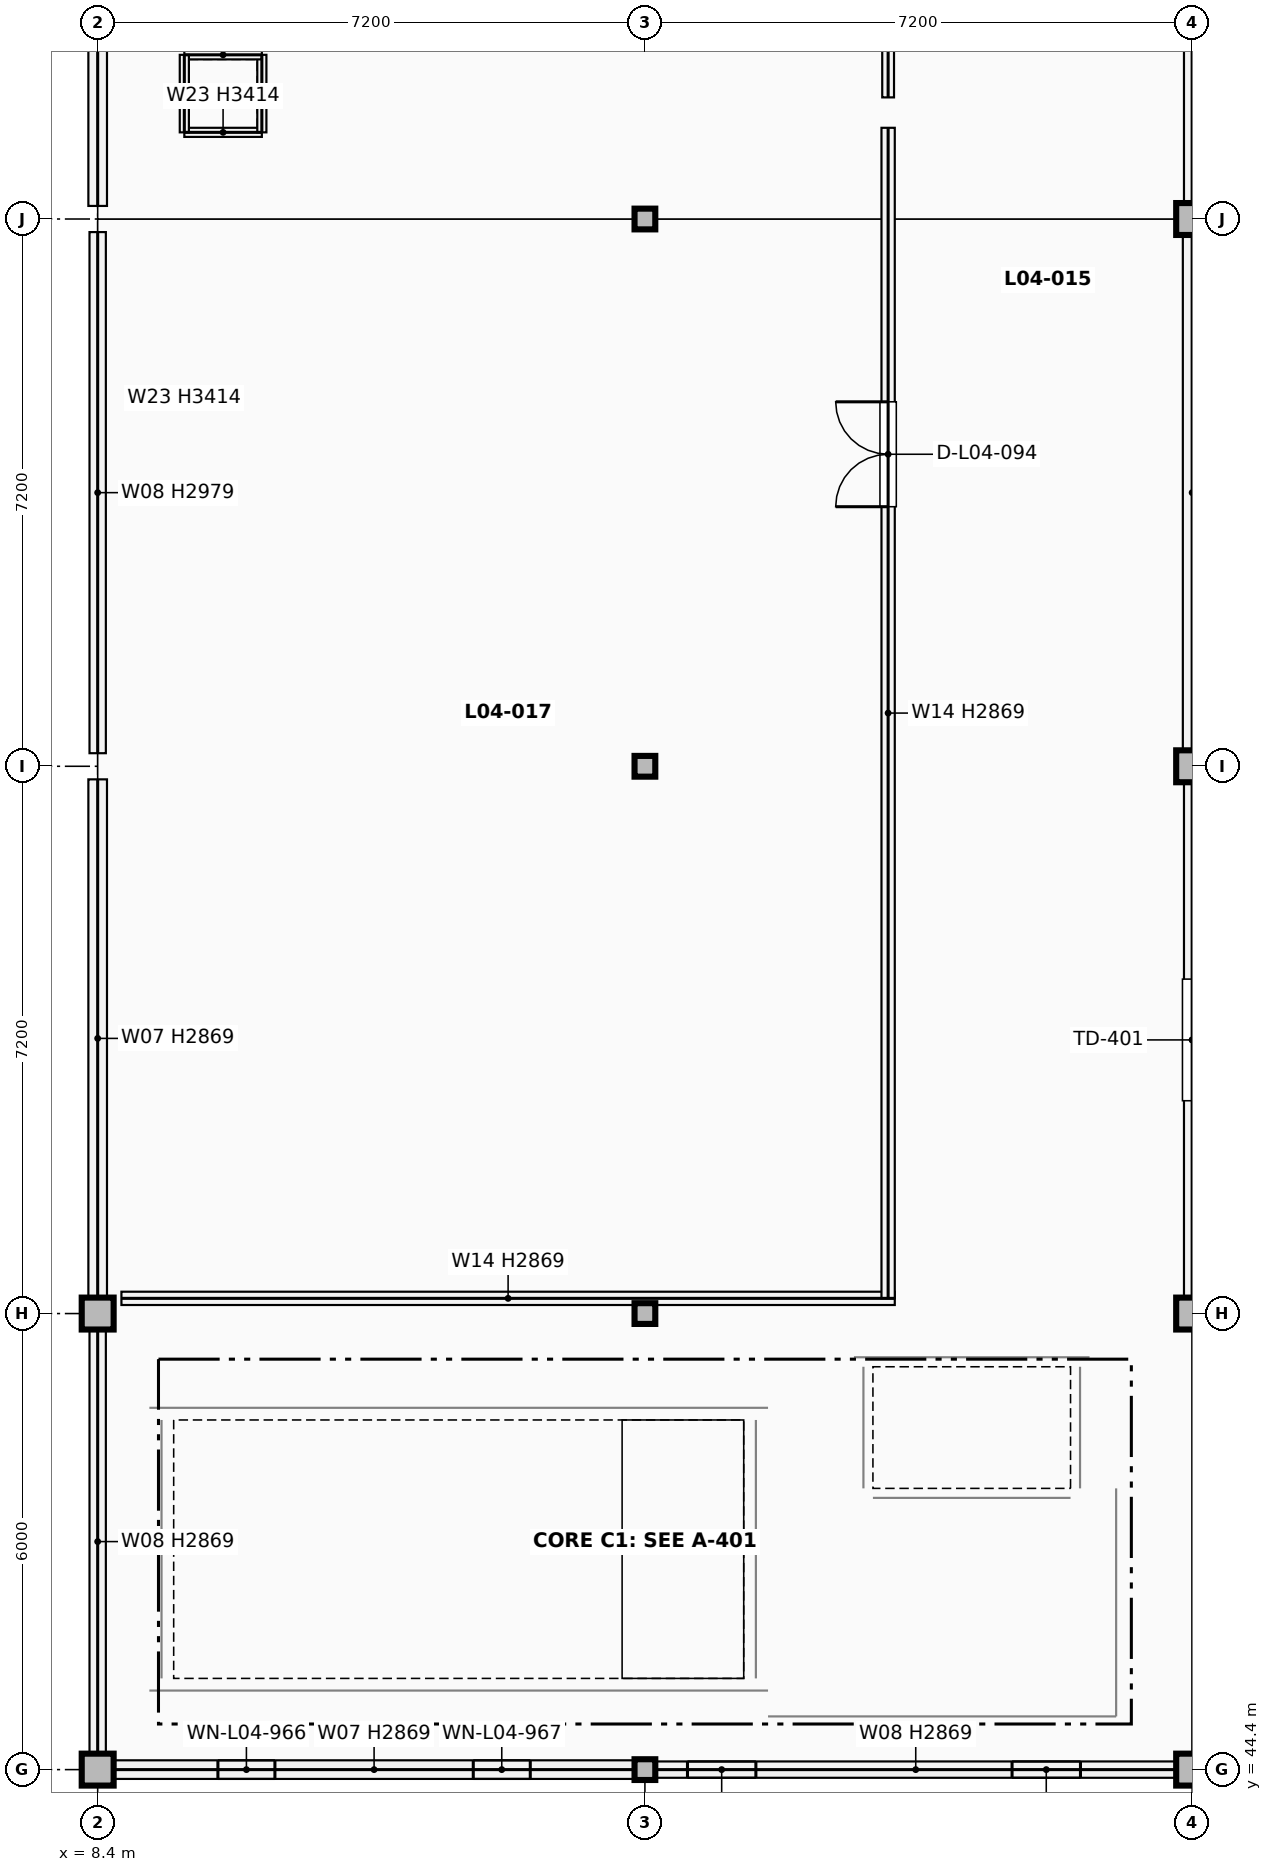
"""IFC4 building model, lengths in metres.
Left out: names, types, materials, properties, quantities, classifications, styles, units other than length and angle.
Written with IfcOpenShell. Run it as: python <this file> out.ifc"""

import sys

from ifc_helpers import new_model, si_unit, direction, frame, frame_2d, origin, origin_2d, place, context, subcontext, project, spatial, rectangle, hollow_circle, extrude, element, fill, save


model = new_model("IFC4")
c1 = context("Model", 3, precision=1e-05, world=origin(), true_north=direction((0.0, 1.0)))
c2 = subcontext(c1, "Body", "Model", "MODEL_VIEW")
j1 = project(units=[si_unit("LENGTHUNIT", "METRE"), si_unit("PLANEANGLEUNIT", "RADIAN")], contexts=[c1])
p1 = place(None, origin())
s1 = spatial("IfcSite", under=j1, at=p1, CompositionType="ELEMENT")
p2 = place(p1, origin())
s2 = spatial("IfcBuilding", under=s1, at=p2, CompositionType="ELEMENT")
p3 = place(p2, frame((0.0, 0.0, 17.34)))
s3 = spatial("IfcBuildingStorey", under=s2, at=p3, CompositionType="ELEMENT", Elevation=17.34)
for number, where, z_axis, x_axis in (
    (1, (8.4, 44.4, 0.0), (0.0, 0.0, 1.0), (1.0, 0.0, 0.0)),
    (2, (8.4, 50.4, 0.0), (0.0, 0.0, 1.0), (1.0, 0.0, 0.0)),
):
    element("IfcColumn", number, at=place(p3, frame(where, z_axis=z_axis, x_axis=x_axis)), inside=s3, PredefinedType="COLUMN", context=c2, shape_type="SweptSolid", body=[
        extrude(rectangle(XDim=0.42, YDim=0.42, at=origin_2d()), origin(), (0.0, 0.0, 1.0), 3.74),
    ])
for number, where, z_axis, x_axis in (
    (3, (15.6, 44.4, 0.0), (0.0, 0.0, 1.0), (1.0, 0.0, 0.0)),
    (4, (15.6, 50.4, 0.0), (0.0, 0.0, 1.0), (1.0, 0.0, 0.0)),
    (5, (15.6, 57.6, 0.0), (0.0, 0.0, 1.0), (1.0, 0.0, 0.0)),
    (6, (15.6, 64.8, 0.0), (0.0, 0.0, 1.0), (1.0, 0.0, 0.0)),
):
    element("IfcColumn", number, at=place(p3, frame(where, z_axis=z_axis, x_axis=x_axis)), inside=s3, PredefinedType="COLUMN", context=c2, shape_type="SweptSolid", body=[
        extrude(hollow_circle(Radius=0.136, WallThickness=0.012, at=origin_2d()), origin(), (0.0, 0.0, 1.0), 3.7),
    ])
for number, where, z_axis, x_axis in (
    (7, (22.8, 44.4, 0.0), (0.0, 0.0, 1.0), (1.0, 0.0, 0.0)),
    (8, (22.8, 50.4, 0.0), (0.0, 0.0, 1.0), (1.0, 0.0, 0.0)),
    (9, (22.8, 57.6, 0.0), (0.0, 0.0, 1.0), (1.0, 0.0, 0.0)),
    (10, (22.8, 64.8, 0.0), (0.0, 0.0, 1.0), (1.0, 0.0, 0.0)),
):
    element("IfcColumn", number, at=place(p3, frame(where, z_axis=z_axis, x_axis=x_axis)), inside=s3, PredefinedType="COLUMN", context=c2, shape_type="SweptSolid", body=[
        extrude(rectangle(XDim=0.42, YDim=0.42, at=origin_2d()), origin(), (0.0, 0.0, 1.0), 3.74),
    ])
p4 = place(p3, frame((8.612, 44.4, 0.0), z_axis=(0.0, 0.0, 1.0), x_axis=(1.0, 0.0, 0.0)))
e11 = element("IfcWall", 11, at=p4, inside=s3, PredefinedType="SOLIDWALL", context=c2, shape_type="SweptSolid", body=[
    extrude(rectangle(XDim=6.849, YDim=0.245, at=frame_2d((3.425, 0.0))), origin(), (0.0, 0.0, 1.0), 2.869),
])
p5 = place(p4, frame((1.37, 0.0, 0.75)))
e12 = element("IfcOpeningElement", 12, at=p5, cuts=e11, PredefinedType="OPENING", context=c2, shape_type="SweptSolid", body=[
    extrude(rectangle(XDim=0.75, YDim=1.5, at=frame_2d((0.375, 0.75))), frame((0.0, 0.133, 0.0), z_axis=(0.0, -1.0, 0.0), x_axis=(1.0, 0.0, 0.0)), (0.0, 0.0, 1.0), 0.265),
])
p6 = place(p4, frame((4.729, 0.0, 0.75)))
e13 = element("IfcOpeningElement", 13, at=p6, cuts=e11, PredefinedType="OPENING", context=c2, shape_type="SweptSolid", body=[
    extrude(rectangle(XDim=0.75, YDim=1.5, at=frame_2d((0.375, 0.75))), frame((0.0, 0.133, 0.0), z_axis=(0.0, -1.0, 0.0), x_axis=(1.0, 0.0, 0.0)), (0.0, 0.0, 1.0), 0.265),
])
p7 = place(p3, frame((15.739, 44.4, 0.0), z_axis=(0.0, 0.0, 1.0), x_axis=(1.0, 0.0, 0.0)))
e14 = element("IfcWall", 14, at=p7, inside=s3, PredefinedType="SOLIDWALL", context=c2, shape_type="SweptSolid", body=[
    extrude(rectangle(XDim=6.849, YDim=0.215, at=frame_2d((3.425, 0.0))), origin(), (0.0, 0.0, 1.0), 2.869),
])
p8 = place(p7, frame((0.421, 0.0, 0.75)))
e15 = element("IfcOpeningElement", 15, at=p8, cuts=e14, PredefinedType="OPENING", context=c2, shape_type="SweptSolid", body=[
    extrude(rectangle(XDim=0.9, YDim=1.95, at=frame_2d((0.45, 0.975))), frame((0.0, 0.118, 0.0), z_axis=(0.0, -1.0, 0.0), x_axis=(1.0, 0.0, 0.0)), (0.0, 0.0, 1.0), 0.235),
])
p9 = place(p7, frame((4.692, 0.0, 0.75)))
e16 = element("IfcOpeningElement", 16, at=p9, cuts=e14, PredefinedType="OPENING", context=c2, shape_type="SweptSolid", body=[
    extrude(rectangle(XDim=0.9, YDim=1.95, at=frame_2d((0.45, 0.975))), frame((0.0, 0.118, 0.0), z_axis=(0.0, -1.0, 0.0), x_axis=(1.0, 0.0, 0.0)), (0.0, 0.0, 1.0), 0.235),
])
p10 = place(p3, frame((8.4, 44.612, 0.0), z_axis=(0.0, 0.0, 1.0), x_axis=(0.0, 1.0, 0.0)))
e17 = element("IfcWall", 17, at=p10, inside=s3, PredefinedType="SOLIDWALL", context=c2, shape_type="SweptSolid", body=[
    extrude(rectangle(XDim=5.576, YDim=0.215, at=frame_2d((2.788, 0.0))), origin(), (0.0, 0.0, 1.0), 2.869),
])
p11 = place(p3, frame((8.4, 50.612, 0.0), z_axis=(0.0, 0.0, 1.0), x_axis=(0.0, 1.0, 0.0)))
e18 = element("IfcWall", 18, at=p11, inside=s3, PredefinedType="SOLIDWALL", context=c2, shape_type="SweptSolid", body=[
    extrude(rectangle(XDim=6.816, YDim=0.245, at=frame_2d((3.408, 0.0))), origin(), (0.0, 0.0, 1.0), 2.869),
])
p12 = place(p3, frame((8.4, 57.772, 0.0), z_axis=(0.0, 0.0, 1.0), x_axis=(0.0, 1.0, 0.0)))
e19 = element("IfcWall", 19, at=p12, inside=s3, PredefinedType="SOLIDWALL", context=c2, shape_type="SweptSolid", body=[
    extrude(rectangle(XDim=6.856, YDim=0.215, at=frame_2d((3.428, 0.0))), origin(), (0.0, 0.0, 1.0), 2.979),
])
p13 = place(p3, frame((8.4, 64.972, 0.0), z_axis=(0.0, 0.0, 1.0), x_axis=(0.0, 1.0, 0.0)))
e20 = element("IfcWall", 20, at=p13, inside=s3, PredefinedType="SOLIDWALL", context=c2, shape_type="SweptSolid", body=[
    extrude(rectangle(XDim=6.856, YDim=0.245, at=frame_2d((3.428, 0.0))), origin(), (0.0, 0.0, 1.0), 2.979),
])
p14 = place(p3, frame((22.8, 50.612, 0.0), z_axis=(0.0, 0.0, 1.0), x_axis=(0.0, 1.0, 0.0)))
e21 = element("IfcWall", 21, at=p14, inside=s3, PredefinedType="SOLIDWALL", context=c2, shape_type="SweptSolid", body=[
    extrude(rectangle(XDim=6.776, YDim=0.215, at=frame_2d((3.388, 0.0))), origin(), (0.0, 0.0, 1.0), 2.869),
])
p15 = place(p14, frame((2.588, 0.0, 0.0)))
e22 = element("IfcOpeningElement", 22, at=p15, cuts=e21, PredefinedType="OPENING", context=c2, shape_type="SweptSolid", body=[
    extrude(rectangle(XDim=1.6, YDim=2.2, at=frame_2d((0.8, 1.1))), frame((0.0, 0.118, 0.0), z_axis=(0.0, -1.0, 0.0), x_axis=(1.0, 0.0, 0.0)), (0.0, 0.0, 1.0), 0.235),
])
p16 = place(p3, frame((22.8, 57.812, 0.0), z_axis=(0.0, 0.0, 1.0), x_axis=(0.0, 1.0, 0.0)))
e23 = element("IfcWall", 23, at=p16, inside=s3, PredefinedType="SOLIDWALL", context=c2, shape_type="SweptSolid", body=[
    extrude(rectangle(XDim=6.776, YDim=0.245, at=frame_2d((3.388, 0.0))), origin(), (0.0, 0.0, 1.0), 2.869),
])
p17 = place(p3, frame((22.8, 65.012, 0.0), z_axis=(0.0, 0.0, 1.0), x_axis=(0.0, 1.0, 0.0)))
e24 = element("IfcWall", 24, at=p17, inside=s3, PredefinedType="SOLIDWALL", context=c2, shape_type="SweptSolid", body=[
    extrude(rectangle(XDim=6.776, YDim=0.215, at=frame_2d((3.388, 0.0))), origin(), (0.0, 0.0, 1.0), 2.869),
])
for number, where, z_axis, x_axis in (
    (25, (9.54, 65.94, 0.0), (0.0, 0.0, 1.0), (1.0, 0.0, 0.0)),
    (26, (10.56, 65.94, 0.0), (0.0, 0.0, 1.0), (0.0, 1.0, 0.0)),
    (27, (10.56, 66.96, 0.0), (0.0, 0.0, 1.0), (-1.0, 0.0, 0.0)),
    (28, (9.54, 66.96, 0.0), (0.0, 0.0, 1.0), (0.0, -1.0, 0.0)),
):
    element("IfcWall", number, at=place(p3, frame(where, z_axis=z_axis, x_axis=x_axis)), inside=s3, PredefinedType="PARTITIONING", context=c2, shape_type="SweptSolid", body=[
        extrude(rectangle(XDim=1.02, YDim=0.12, at=frame_2d((0.51, 0.0))), origin(), (0.0, 0.0, 1.0), 3.414),
    ])
p18 = place(p3, frame((9.24, 45.6, 0.0), z_axis=(0.0, 0.0, 1.0), x_axis=(0.0, 1.0, 0.0)))
e29 = element("IfcWall", 29, at=p18, inside=s3, PredefinedType="SHEAR", context=c2, shape_type="SweptSolid", body=[
    extrude(rectangle(XDim=3.4, YDim=0.32, at=frame_2d((1.7, 0.0))), origin(), (0.0, 0.0, 1.0), 3.74),
])
for number, where, z_axis, x_axis in (
    (30, (9.08, 45.44, 0.0), (0.0, 0.0, 1.0), (1.0, 0.0, 0.0)),
    (31, (9.08, 49.16, 0.0), (0.0, 0.0, 1.0), (1.0, 0.0, 0.0)),
):
    element("IfcWall", number, at=place(p3, frame(where, z_axis=z_axis, x_axis=x_axis)), inside=s3, PredefinedType="SHEAR", context=c2, shape_type="SweptSolid", body=[
        extrude(rectangle(XDim=8.14, YDim=0.32, at=frame_2d((4.07, 0.0))), origin(), (0.0, 0.0, 1.0), 3.74),
    ])
p19 = place(p3, frame((17.06, 45.6, 0.0), z_axis=(0.0, 0.0, 1.0), x_axis=(0.0, 1.0, 0.0)))
e32 = element("IfcWall", 32, at=p19, inside=s3, PredefinedType="SHEAR", context=c2, shape_type="SweptSolid", body=[
    extrude(rectangle(XDim=3.4, YDim=0.32, at=frame_2d((1.7, 0.0))), origin(), (0.0, 0.0, 1.0), 3.74),
])
p20 = place(p19, frame((0.65, 0.0, 0.0)))
e33 = element("IfcOpeningElement", 33, at=p20, cuts=e32, PredefinedType="OPENING", context=c2, shape_type="SweptSolid", body=[
    extrude(rectangle(XDim=1.2, YDim=2.2, at=frame_2d((0.6, 1.1))), frame((0.0, 0.17, 0.0), z_axis=(0.0, -1.0, 0.0), x_axis=(1.0, 0.0, 0.0)), (0.0, 0.0, 1.0), 0.34),
])
for number, where, z_axis, x_axis in (
    (34, (18.475, 48.1, 0.0), (0.0, 0.0, 1.0), (0.0, 1.0, 0.0)),
    (35, (21.325, 48.1, 0.0), (0.0, 0.0, 1.0), (0.0, 1.0, 0.0)),
):
    element("IfcWall", number, at=place(p3, frame(where, z_axis=z_axis, x_axis=x_axis)), inside=s3, PredefinedType="SHEAR", context=c2, shape_type="SweptSolid", body=[
        extrude(rectangle(XDim=1.6, YDim=0.25, at=frame_2d((0.8, 0.0))), origin(), (0.0, 0.0, 1.0), 3.74),
    ])
p21 = place(p3, frame((18.35, 49.825, 0.0), z_axis=(0.0, 0.0, 1.0), x_axis=(1.0, 0.0, 0.0)))
e36 = element("IfcWall", 36, at=p21, inside=s3, PredefinedType="SHEAR", context=c2, shape_type="SweptSolid", body=[
    extrude(rectangle(XDim=3.1, YDim=0.25, at=frame_2d((1.55, 0.0))), origin(), (0.0, 0.0, 1.0), 3.74),
])
p22 = place(p3, frame((18.6, 47.975, 0.0), z_axis=(0.0, 0.0, 1.0), x_axis=(1.0, 0.0, 0.0)))
e37 = element("IfcWall", 37, at=p22, inside=s3, PredefinedType="SHEAR", context=c2, shape_type="SweptSolid", body=[
    extrude(rectangle(XDim=2.6, YDim=0.25, at=frame_2d((1.3, 0.0))), origin(), (0.0, 0.0, 1.0), 3.74),
])
p23 = place(p22, frame((0.75, 0.0, 0.0)))
e38 = element("IfcOpeningElement", 38, at=p23, cuts=e37, PredefinedType="OPENING", context=c2, shape_type="SweptSolid", body=[
    extrude(rectangle(XDim=1.1, YDim=2.15, at=frame_2d((0.55, 1.075))), frame((0.0, 0.135, 0.0), z_axis=(0.0, -1.0, 0.0), x_axis=(1.0, 0.0, 0.0)), (0.0, 0.0, 1.0), 0.27),
])
p24 = place(p3, frame((21.8, 45.1, 0.0), z_axis=(0.0, 0.0, 1.0), x_axis=(0.0, 1.0, 0.0)))
e39 = element("IfcWall", 39, at=p24, inside=s3, PredefinedType="PARTITIONING", context=c2, shape_type="SweptSolid", body=[
    extrude(rectangle(XDim=3.0, YDim=0.2, at=frame_2d((1.5, 0.0))), origin(), (0.0, 0.0, 1.0), 3.414),
])
p25 = place(p24, frame((0.775, 0.0, 0.0)))
e40 = element("IfcOpeningElement", 40, at=p25, cuts=e39, PredefinedType="OPENING", context=c2, shape_type="SweptSolid", body=[
    extrude(rectangle(XDim=1.45, YDim=2.2, at=frame_2d((0.725, 1.1))), frame((0.0, 0.11, 0.0), z_axis=(0.0, -1.0, 0.0), x_axis=(1.0, 0.0, 0.0)), (0.0, 0.0, 1.0), 0.22),
])
p26 = place(p3, frame((17.22, 45.1, 0.0), z_axis=(0.0, 0.0, 1.0), x_axis=(1.0, 0.0, 0.0)))
e41 = element("IfcWall", 41, at=p26, inside=s3, PredefinedType="PARTITIONING", context=c2, shape_type="SweptSolid", body=[
    extrude(rectangle(XDim=4.58, YDim=0.2, at=frame_2d((2.29, 0.0))), origin(), (0.0, 0.0, 1.0), 3.414),
])
p27 = place(p3, frame((8.712, 50.6, 0.0), z_axis=(0.0, 0.0, 1.0), x_axis=(1.0, 0.0, 0.0)))
e42 = element("IfcWall", 42, at=p27, inside=s3, PredefinedType="PARTITIONING", context=c2, shape_type="SweptSolid", body=[
    extrude(rectangle(XDim=10.175, YDim=0.175, at=frame_2d((5.087, 0.0))), origin(), (0.0, 0.0, 1.0), 2.869),
])
p28 = place(p3, frame((18.8, 50.6, 0.0), z_axis=(0.0, 0.0, 1.0), x_axis=(0.0, 1.0, 0.0)))
e43 = element("IfcWall", 43, at=p28, inside=s3, PredefinedType="PARTITIONING", context=c2, shape_type="SweptSolid", body=[
    extrude(rectangle(XDim=15.4, YDim=0.175, at=frame_2d((7.7, 0.0))), origin(), (0.0, 0.0, 1.0), 2.869),
])
p29 = place(p28, frame((10.415, 0.0, 0.0)))
e44 = element("IfcOpeningElement", 44, at=p29, cuts=e43, PredefinedType="OPENING", context=c2, shape_type="SweptSolid", body=[
    extrude(rectangle(XDim=1.38, YDim=2.28, at=frame_2d((0.69, 1.14))), frame((0.0, 0.098, 0.0), z_axis=(0.0, -1.0, 0.0), x_axis=(1.0, 0.0, 0.0)), (0.0, 0.0, 1.0), 0.195),
])
p30 = place(p3, frame((18.8, 66.4, 0.0), z_axis=(0.0, 0.0, 1.0), x_axis=(0.0, 1.0, 0.0)))
e45 = element("IfcWall", 45, at=p30, inside=s3, PredefinedType="PARTITIONING", context=c2, shape_type="SweptSolid", body=[
    extrude(rectangle(XDim=12.0, YDim=0.155, at=frame_2d((6.0, 0.0))), origin(), (0.0, 0.0, 1.0), 2.869),
])
p31 = place(p30, frame((1.234, 0.0, 0.0)))
e46 = element("IfcOpeningElement", 46, at=p31, cuts=e45, PredefinedType="OPENING", context=c2, shape_type="SweptSolid", body=[
    extrude(rectangle(XDim=1.26, YDim=2.26, at=frame_2d((0.63, 1.13))), frame((0.0, 0.087, 0.0), z_axis=(0.0, -1.0, 0.0), x_axis=(1.0, 0.0, 0.0)), (0.0, 0.0, 1.0), 0.175),
])
p32 = place(p5, origin())
e47 = element("IfcWindow", 47, at=p32, inside=s3, PartitioningType="SINGLE_PANEL", PredefinedType="WINDOW", context=c2, shape_type="SweptSolid", body=[
    extrude(rectangle(XDim=0.75, YDim=1.5, at=frame_2d((0.375, 0.75))), frame((0.0, 0.03, 0.0), z_axis=(0.0, -1.0, 0.0), x_axis=(1.0, 0.0, 0.0)), (0.0, 0.0, 1.0), 0.06),
])
fill(e12, e47)
p33 = place(p6, origin())
e48 = element("IfcWindow", 48, at=p33, inside=s3, PartitioningType="SINGLE_PANEL", PredefinedType="WINDOW", context=c2, shape_type="SweptSolid", body=[
    extrude(rectangle(XDim=0.75, YDim=1.5, at=frame_2d((0.375, 0.75))), frame((0.0, 0.03, 0.0), z_axis=(0.0, -1.0, 0.0), x_axis=(1.0, 0.0, 0.0)), (0.0, 0.0, 1.0), 0.06),
])
fill(e13, e48)
p34 = place(p8, origin())
e49 = element("IfcWindow", 49, at=p34, inside=s3, PartitioningType="SINGLE_PANEL", PredefinedType="WINDOW", context=c2, shape_type="SweptSolid", body=[
    extrude(rectangle(XDim=0.9, YDim=1.95, at=frame_2d((0.45, 0.975))), frame((0.0, 0.03, 0.0), z_axis=(0.0, -1.0, 0.0), x_axis=(1.0, 0.0, 0.0)), (0.0, 0.0, 1.0), 0.06),
])
fill(e15, e49)
p35 = place(p9, origin())
e50 = element("IfcWindow", 50, at=p35, inside=s3, PartitioningType="SINGLE_PANEL", PredefinedType="WINDOW", context=c2, shape_type="SweptSolid", body=[
    extrude(rectangle(XDim=0.9, YDim=1.95, at=frame_2d((0.45, 0.975))), frame((0.0, 0.03, 0.0), z_axis=(0.0, -1.0, 0.0), x_axis=(1.0, 0.0, 0.0)), (0.0, 0.0, 1.0), 0.06),
])
fill(e16, e50)
p36 = place(p15, frame((1.6, 0.0, 0.0), z_axis=(0.0, 0.0, 1.0), x_axis=(-1.0, 0.0, 0.0)))
e51 = element("IfcDoor", 51, at=p36, inside=s3, OperationType="DOUBLE_DOOR_SINGLE_SWING", PredefinedType="DOOR", context=c2, shape_type="SweptSolid", body=[
    extrude(rectangle(XDim=1.6, YDim=2.2, at=frame_2d((0.8, 1.1))), frame((0.0, 0.025, 0.0), z_axis=(0.0, -1.0, 0.0), x_axis=(1.0, 0.0, 0.0)), (0.0, 0.0, 1.0), 0.05),
])
fill(e22, e51)
p37 = place(p20, origin())
e52 = element("IfcDoor", 52, at=p37, inside=s3, OperationType="SINGLE_SWING_LEFT", PredefinedType="DOOR", context=c2, shape_type="SweptSolid", body=[
    extrude(rectangle(XDim=1.2, YDim=2.2, at=frame_2d((0.6, 1.1))), frame((0.0, 0.025, 0.0), z_axis=(0.0, -1.0, 0.0), x_axis=(1.0, 0.0, 0.0)), (0.0, 0.0, 1.0), 0.05),
])
fill(e33, e52)
p38 = place(p23, origin())
e53 = element("IfcDoor", 53, at=p38, inside=s3, OperationType="DOUBLE_DOOR_SLIDING", PredefinedType="DOOR", context=c2, shape_type="SweptSolid", body=[
    extrude(rectangle(XDim=1.1, YDim=2.15, at=frame_2d((0.55, 1.075))), frame((0.0, 0.025, 0.0), z_axis=(0.0, -1.0, 0.0), x_axis=(1.0, 0.0, 0.0)), (0.0, 0.0, 1.0), 0.05),
])
fill(e38, e53)
p39 = place(p25, frame((1.45, 0.0, 0.0), z_axis=(0.0, 0.0, 1.0), x_axis=(-1.0, 0.0, 0.0)))
e54 = element("IfcDoor", 54, at=p39, inside=s3, OperationType="DOUBLE_DOOR_SINGLE_SWING", PredefinedType="DOOR", context=c2, shape_type="SweptSolid", body=[
    extrude(rectangle(XDim=1.45, YDim=2.2, at=frame_2d((0.725, 1.1))), frame((0.0, 0.025, 0.0), z_axis=(0.0, -1.0, 0.0), x_axis=(1.0, 0.0, 0.0)), (0.0, 0.0, 1.0), 0.05),
])
fill(e40, e54)
p40 = place(p29, origin())
e55 = element("IfcDoor", 55, at=p40, inside=s3, OperationType="DOUBLE_DOOR_SINGLE_SWING", PredefinedType="DOOR", context=c2, shape_type="SweptSolid", body=[
    extrude(rectangle(XDim=1.38, YDim=2.28, at=frame_2d((0.69, 1.14))), frame((0.0, 0.025, 0.0), z_axis=(0.0, -1.0, 0.0), x_axis=(1.0, 0.0, 0.0)), (0.0, 0.0, 1.0), 0.05),
])
fill(e44, e55)
save(model, sys.argv[1])
